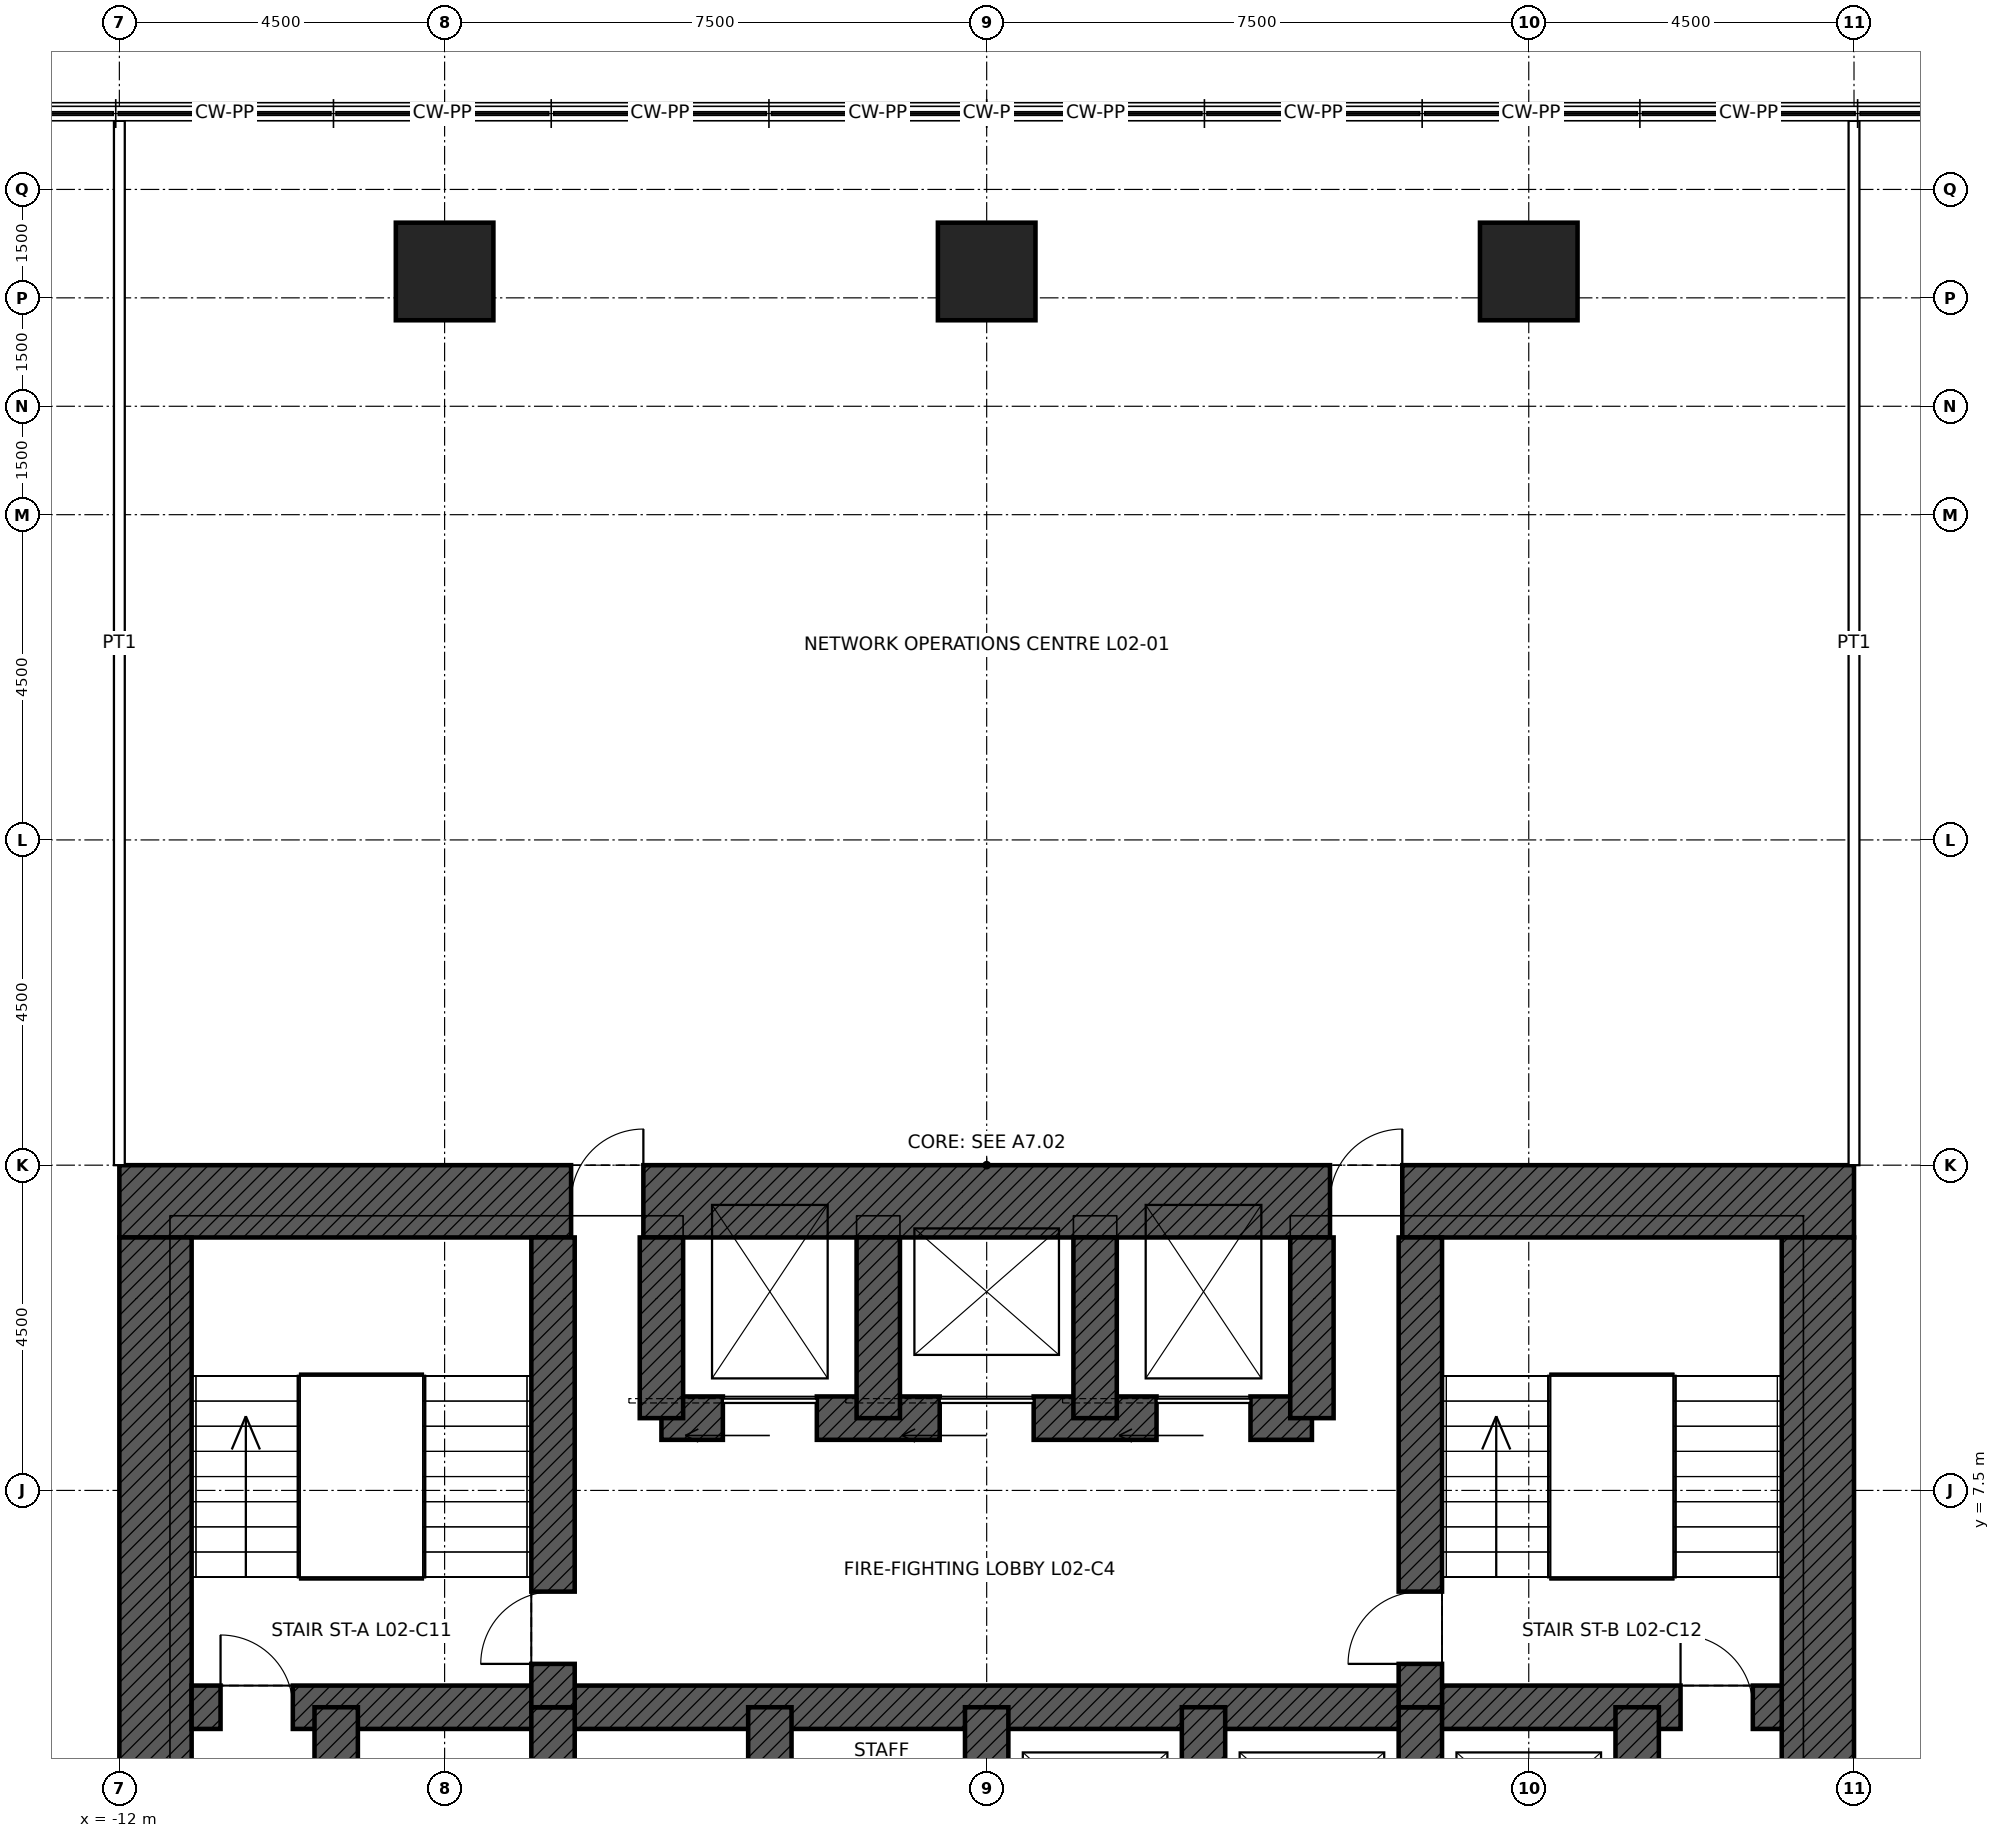
"""IFC4 building model, lengths in metres.
Left out: names, types, materials, properties, quantities, classifications, styles, units other than length and angle.
Written with IfcOpenShell. Run it as: python <this file> out.ifc"""

import sys

from ifc_helpers import new_model, si_unit, direction, frame, frame_2d, origin, origin_2d, place, context, subcontext, project, spatial, rectangle, hollow_rectangle, extrude, element, fill, save


model = new_model("IFC4")
c1 = context("Model", 3, precision=1e-05, world=origin(), true_north=direction((0.0, 1.0)))
c2 = subcontext(c1, "Body", "Model", "MODEL_VIEW")
j1 = project(units=[si_unit("LENGTHUNIT", "METRE"), si_unit("PLANEANGLEUNIT", "RADIAN")], contexts=[c1])
p1 = place(None, origin())
s1 = spatial("IfcSite", under=j1, at=p1, CompositionType="ELEMENT")
p2 = place(p1, origin())
s2 = spatial("IfcBuilding", under=s1, at=p2, CompositionType="ELEMENT")
p3 = place(p2, frame((0.0, 0.0, 12.6)))
s3 = spatial("IfcBuildingStorey", under=s2, at=p3, CompositionType="ELEMENT", Elevation=12.6)
for number, where, z_axis, x_axis in (
    (1, (-7.5, 24.365, 0.0), (0.0, 0.0, 1.0), (1.0, 0.0, 0.0)),
    (2, (0.0, 24.365, 0.0), (0.0, 0.0, 1.0), (1.0, 0.0, 0.0)),
    (3, (7.5, 24.365, 0.0), (0.0, 0.0, 1.0), (1.0, 0.0, 0.0)),
):
    element("IfcColumn", number, at=place(p3, frame(where, z_axis=z_axis, x_axis=x_axis)), inside=s3, PredefinedType="COLUMN", context=c2, shape_type="SweptSolid", body=[
        extrude(hollow_rectangle(XDim=1.35, YDim=1.35, WallThickness=0.1, at=origin_2d()), origin(), (0.0, 0.0, 1.0), 5.4),
    ])
p4 = place(p3, frame((-12.0, 11.5, 0.0), z_axis=(0.0, 0.0, 1.0), x_axis=(1.0, 0.0, 0.0)))
e4 = element("IfcWall", 4, at=p4, inside=s3, PredefinedType="SHEAR", context=c2, shape_type="SweptSolid", body=[
    extrude(rectangle(XDim=24.0, YDim=1.0, at=frame_2d((12.0, 0.0))), origin(), (0.0, 0.0, 1.0), 5.4),
])
p5 = place(p4, frame((6.25, 0.0, 0.0)))
e5 = element("IfcOpeningElement", 5, at=p5, cuts=e4, PredefinedType="OPENING", context=c2, shape_type="SweptSolid", body=[
    extrude(rectangle(XDim=1.0, YDim=2.4, at=frame_2d((0.5, 1.2))), frame((0.0, 0.51, 0.0), z_axis=(0.0, -1.0, 0.0), x_axis=(1.0, 0.0, 0.0)), (0.0, 0.0, 1.0), 1.02),
])
p6 = place(p4, frame((16.75, 0.0, 0.0)))
e6 = element("IfcOpeningElement", 6, at=p6, cuts=e4, PredefinedType="OPENING", context=c2, shape_type="SweptSolid", body=[
    extrude(rectangle(XDim=1.0, YDim=2.4, at=frame_2d((0.5, 1.2))), frame((0.0, 0.51, 0.0), z_axis=(0.0, -1.0, 0.0), x_axis=(1.0, 0.0, 0.0)), (0.0, 0.0, 1.0), 1.02),
])
p7 = place(p3, frame((11.5, 11.0, 0.0), z_axis=(0.0, 0.0, 1.0), x_axis=(0.0, -1.0, 0.0)))
e7 = element("IfcWall", 7, at=p7, inside=s3, PredefinedType="SHEAR", context=c2, shape_type="SweptSolid", body=[
    extrude(rectangle(XDim=22.0, YDim=1.0, at=frame_2d((11.0, 0.0))), origin(), (0.0, 0.0, 1.0), 5.4),
])
p8 = place(p7, frame((10.5, 0.0, 0.0)))
e8 = element("IfcOpeningElement", 8, at=p8, cuts=e7, PredefinedType="OPENING", context=c2, shape_type="SweptSolid", body=[
    extrude(rectangle(XDim=1.0, YDim=2.4, at=frame_2d((0.5, 1.2))), frame((0.0, 0.51, 0.0), z_axis=(0.0, -1.0, 0.0), x_axis=(1.0, 0.0, 0.0)), (0.0, 0.0, 1.0), 1.02),
])
p9 = place(p3, frame((-11.5, -11.0, 0.0), z_axis=(0.0, 0.0, 1.0), x_axis=(0.0, 1.0, 0.0)))
e9 = element("IfcWall", 9, at=p9, inside=s3, PredefinedType="SHEAR", context=c2, shape_type="SweptSolid", body=[
    extrude(rectangle(XDim=22.0, YDim=1.0, at=frame_2d((11.0, 0.0))), origin(), (0.0, 0.0, 1.0), 5.4),
])
p10 = place(p9, frame((10.5, 0.0, 0.0)))
e10 = element("IfcOpeningElement", 10, at=p10, cuts=e9, PredefinedType="OPENING", context=c2, shape_type="SweptSolid", body=[
    extrude(rectangle(XDim=1.0, YDim=2.4, at=frame_2d((0.5, 1.2))), frame((0.0, 0.51, 0.0), z_axis=(0.0, -1.0, 0.0), x_axis=(1.0, 0.0, 0.0)), (0.0, 0.0, 1.0), 1.02),
])
p11 = place(p3, frame((-11.0, 4.5, 0.0), z_axis=(0.0, 0.0, 1.0), x_axis=(1.0, 0.0, 0.0)))
e11 = element("IfcWall", 11, at=p11, inside=s3, PredefinedType="SHEAR", context=c2, shape_type="SweptSolid", body=[
    extrude(rectangle(XDim=22.0, YDim=0.6, at=frame_2d((11.0, 0.0))), origin(), (0.0, 0.0, 1.0), 5.4),
])
p12 = place(p11, frame((0.4, 0.0, 0.0)))
e12 = element("IfcOpeningElement", 12, at=p12, cuts=e11, PredefinedType="OPENING", context=c2, shape_type="SweptSolid", body=[
    extrude(rectangle(XDim=1.0, YDim=2.1, at=frame_2d((0.5, 1.05))), frame((0.0, 0.31, 0.0), z_axis=(0.0, -1.0, 0.0), x_axis=(1.0, 0.0, 0.0)), (0.0, 0.0, 1.0), 0.62),
])
p13 = place(p11, frame((20.6, 0.0, 0.0)))
e13 = element("IfcOpeningElement", 13, at=p13, cuts=e11, PredefinedType="OPENING", context=c2, shape_type="SweptSolid", body=[
    extrude(rectangle(XDim=1.0, YDim=2.1, at=frame_2d((0.5, 1.05))), frame((0.0, 0.31, 0.0), z_axis=(0.0, -1.0, 0.0), x_axis=(1.0, 0.0, 0.0)), (0.0, 0.0, 1.0), 0.62),
])
p14 = place(p3, frame((-4.5, 8.5, 0.0), z_axis=(0.0, 0.0, 1.0), x_axis=(1.0, 0.0, 0.0)))
e14 = element("IfcWall", 14, at=p14, inside=s3, PredefinedType="SHEAR", context=c2, shape_type="SweptSolid", body=[
    extrude(rectangle(XDim=9.0, YDim=0.6, at=frame_2d((4.5, 0.0))), origin(), (0.0, 0.0, 1.0), 5.4),
])
p15 = place(p14, frame((0.85, 0.0, 0.0)))
e15 = element("IfcOpeningElement", 15, at=p15, cuts=e14, PredefinedType="OPENING", context=c2, shape_type="SweptSolid", body=[
    extrude(rectangle(XDim=1.3, YDim=2.4, at=frame_2d((0.65, 1.2))), frame((0.0, 0.31, 0.0), z_axis=(0.0, -1.0, 0.0), x_axis=(1.0, 0.0, 0.0)), (0.0, 0.0, 1.0), 0.62),
])
p16 = place(p14, frame((6.85, 0.0, 0.0)))
e16 = element("IfcOpeningElement", 16, at=p16, cuts=e14, PredefinedType="OPENING", context=c2, shape_type="SweptSolid", body=[
    extrude(rectangle(XDim=1.3, YDim=2.4, at=frame_2d((0.65, 1.2))), frame((0.0, 0.31, 0.0), z_axis=(0.0, -1.0, 0.0), x_axis=(1.0, 0.0, 0.0)), (0.0, 0.0, 1.0), 0.62),
])
p17 = place(p14, frame((3.85, 0.0, 0.0)))
e17 = element("IfcOpeningElement", 17, at=p17, cuts=e14, PredefinedType="OPENING", context=c2, shape_type="SweptSolid", body=[
    extrude(rectangle(XDim=1.3, YDim=2.4, at=frame_2d((0.65, 1.2))), frame((0.0, 0.31, 0.0), z_axis=(0.0, -1.0, 0.0), x_axis=(1.0, 0.0, 0.0)), (0.0, 0.0, 1.0), 0.62),
])
for number, where, z_axis, x_axis in (
    (18, (-9.0, 1.5, 0.0), (0.0, 0.0, 1.0), (0.0, 1.0, 0.0)),
    (19, (9.0, 1.5, 0.0), (0.0, 0.0, 1.0), (0.0, 1.0, 0.0)),
    (20, (-6.0, 1.5, 0.0), (0.0, 0.0, 1.0), (0.0, 1.0, 0.0)),
    (21, (-3.0, 1.5, 0.0), (0.0, 0.0, 1.0), (0.0, 1.0, 0.0)),
    (22, (0.0, 1.5, 0.0), (0.0, 0.0, 1.0), (0.0, 1.0, 0.0)),
    (23, (3.0, 1.5, 0.0), (0.0, 0.0, 1.0), (0.0, 1.0, 0.0)),
    (24, (6.0, 1.5, 0.0), (0.0, 0.0, 1.0), (0.0, 1.0, 0.0)),
):
    element("IfcWall", number, at=place(p3, frame(where, z_axis=z_axis, x_axis=x_axis)), inside=s3, PredefinedType="SHEAR", context=c2, shape_type="SweptSolid", body=[
        extrude(rectangle(XDim=3.0, YDim=0.6, at=frame_2d((1.5, 0.0))), origin(), (0.0, 0.0, 1.0), 5.4),
    ])
p18 = place(p3, frame((-6.0, 4.5, 0.0), z_axis=(0.0, 0.0, 1.0), x_axis=(0.0, 1.0, 0.0)))
e25 = element("IfcWall", 25, at=p18, inside=s3, PredefinedType="SHEAR", context=c2, shape_type="SweptSolid", body=[
    extrude(rectangle(XDim=6.5, YDim=0.6, at=frame_2d((3.25, 0.0))), origin(), (0.0, 0.0, 1.0), 5.4),
])
p19 = place(p18, frame((0.6, 0.0, 0.0)))
e26 = element("IfcOpeningElement", 26, at=p19, cuts=e25, PredefinedType="OPENING", context=c2, shape_type="SweptSolid", body=[
    extrude(rectangle(XDim=1.0, YDim=2.1, at=frame_2d((0.5, 1.05))), frame((0.0, 0.31, 0.0), z_axis=(0.0, -1.0, 0.0), x_axis=(1.0, 0.0, 0.0)), (0.0, 0.0, 1.0), 0.62),
])
p20 = place(p3, frame((6.0, 4.5, 0.0), z_axis=(0.0, 0.0, 1.0), x_axis=(0.0, 1.0, 0.0)))
e27 = element("IfcWall", 27, at=p20, inside=s3, PredefinedType="SHEAR", context=c2, shape_type="SweptSolid", body=[
    extrude(rectangle(XDim=6.5, YDim=0.6, at=frame_2d((3.25, 0.0))), origin(), (0.0, 0.0, 1.0), 5.4),
])
p21 = place(p20, frame((0.6, 0.0, 0.0)))
e28 = element("IfcOpeningElement", 28, at=p21, cuts=e27, PredefinedType="OPENING", context=c2, shape_type="SweptSolid", body=[
    extrude(rectangle(XDim=1.0, YDim=2.1, at=frame_2d((0.5, 1.05))), frame((0.0, 0.31, 0.0), z_axis=(0.0, -1.0, 0.0), x_axis=(1.0, 0.0, 0.0)), (0.0, 0.0, 1.0), 0.62),
])
for number, where, z_axis, x_axis in (
    (29, (-4.5, 8.5, 0.0), (0.0, 0.0, 1.0), (0.0, 1.0, 0.0)),
    (30, (4.5, 8.5, 0.0), (0.0, 0.0, 1.0), (0.0, 1.0, 0.0)),
    (31, (-1.5, 8.5, 0.0), (0.0, 0.0, 1.0), (0.0, 1.0, 0.0)),
    (32, (1.5, 8.5, 0.0), (0.0, 0.0, 1.0), (0.0, 1.0, 0.0)),
):
    element("IfcWall", number, at=place(p3, frame(where, z_axis=z_axis, x_axis=x_axis)), inside=s3, PredefinedType="SHEAR", context=c2, shape_type="SweptSolid", body=[
        extrude(rectangle(XDim=2.5, YDim=0.6, at=frame_2d((1.25, 0.0))), origin(), (0.0, 0.0, 1.0), 5.4),
    ])
p22 = place(p3, frame((-12.0, 12.0, 0.0), z_axis=(0.0, 0.0, 1.0), x_axis=(0.0, 1.0, 0.0)))
e33 = element("IfcWall", 33, at=p22, inside=s3, PredefinedType="PARTITIONING", context=c2, shape_type="SweptSolid", body=[
    extrude(rectangle(XDim=14.45, YDim=0.15, at=frame_2d((7.225, 0.0))), origin(), (0.0, 0.0, 1.0), 4.108),
])
p23 = place(p3, frame((12.0, 12.0, 0.0), z_axis=(0.0, 0.0, 1.0), x_axis=(0.0, 1.0, 0.0)))
e34 = element("IfcWall", 34, at=p23, inside=s3, PredefinedType="PARTITIONING", context=c2, shape_type="SweptSolid", body=[
    extrude(rectangle(XDim=14.45, YDim=0.15, at=frame_2d((7.225, 0.0))), origin(), (0.0, 0.0, 1.0), 5.15),
])
p24 = place(p12, origin())
e35 = element("IfcDoor", 35, at=p24, inside=s3, OperationType="SINGLE_SWING_LEFT", PredefinedType="DOOR", context=c2, shape_type="SweptSolid", body=[
    extrude(rectangle(XDim=1.0, YDim=2.1, at=frame_2d((0.5, 1.05))), frame((0.0, 0.025, 0.0), z_axis=(0.0, -1.0, 0.0), x_axis=(1.0, 0.0, 0.0)), (0.0, 0.0, 1.0), 0.05),
])
fill(e12, e35)
p25 = place(p13, origin())
e36 = element("IfcDoor", 36, at=p25, inside=s3, OperationType="SINGLE_SWING_LEFT", PredefinedType="DOOR", context=c2, shape_type="SweptSolid", body=[
    extrude(rectangle(XDim=1.0, YDim=2.1, at=frame_2d((0.5, 1.05))), frame((0.0, 0.025, 0.0), z_axis=(0.0, -1.0, 0.0), x_axis=(1.0, 0.0, 0.0)), (0.0, 0.0, 1.0), 0.05),
])
fill(e13, e36)
p26 = place(p19, origin())
e37 = element("IfcDoor", 37, at=p26, inside=s3, OperationType="SINGLE_SWING_LEFT", PredefinedType="DOOR", context=c2, shape_type="SweptSolid", body=[
    extrude(rectangle(XDim=1.0, YDim=2.1, at=frame_2d((0.5, 1.05))), frame((0.0, 0.025, 0.0), z_axis=(0.0, -1.0, 0.0), x_axis=(1.0, 0.0, 0.0)), (0.0, 0.0, 1.0), 0.05),
])
fill(e26, e37)
p27 = place(p21, origin())
e38 = element("IfcDoor", 38, at=p27, inside=s3, OperationType="SINGLE_SWING_LEFT", PredefinedType="DOOR", context=c2, shape_type="SweptSolid", body=[
    extrude(rectangle(XDim=1.0, YDim=2.1, at=frame_2d((0.5, 1.05))), frame((0.0, 0.025, 0.0), z_axis=(0.0, -1.0, 0.0), x_axis=(1.0, 0.0, 0.0)), (0.0, 0.0, 1.0), 0.05),
])
fill(e28, e38)
p28 = place(p5, origin())
e39 = element("IfcDoor", 39, at=p28, inside=s3, OperationType="SINGLE_SWING_RIGHT", PredefinedType="DOOR", context=c2, shape_type="SweptSolid", body=[
    extrude(rectangle(XDim=1.0, YDim=2.4, at=frame_2d((0.5, 1.2))), frame((0.0, 0.485, 0.0), z_axis=(0.0, -1.0, 0.0), x_axis=(1.0, 0.0, 0.0)), (0.0, 0.0, 1.0), 0.05),
])
fill(e5, e39)
p29 = place(p6, origin())
e40 = element("IfcDoor", 40, at=p29, inside=s3, OperationType="SINGLE_SWING_RIGHT", PredefinedType="DOOR", context=c2, shape_type="SweptSolid", body=[
    extrude(rectangle(XDim=1.0, YDim=2.4, at=frame_2d((0.5, 1.2))), frame((0.0, 0.485, 0.0), z_axis=(0.0, -1.0, 0.0), x_axis=(1.0, 0.0, 0.0)), (0.0, 0.0, 1.0), 0.05),
])
fill(e6, e40)
p30 = place(p15, origin())
e41 = element("IfcDoor", 41, at=p30, inside=s3, OperationType="SLIDING_TO_LEFT", PredefinedType="DOOR", context=c2, shape_type="SweptSolid", body=[
    extrude(rectangle(XDim=1.3, YDim=2.4, at=frame_2d((0.65, 1.2))), frame((0.0, 0.025, 0.0), z_axis=(0.0, -1.0, 0.0), x_axis=(1.0, 0.0, 0.0)), (0.0, 0.0, 1.0), 0.05),
])
fill(e15, e41)
p31 = place(p16, origin())
e42 = element("IfcDoor", 42, at=p31, inside=s3, OperationType="SLIDING_TO_LEFT", PredefinedType="DOOR", context=c2, shape_type="SweptSolid", body=[
    extrude(rectangle(XDim=1.3, YDim=2.4, at=frame_2d((0.65, 1.2))), frame((0.0, 0.025, 0.0), z_axis=(0.0, -1.0, 0.0), x_axis=(1.0, 0.0, 0.0)), (0.0, 0.0, 1.0), 0.05),
])
fill(e16, e42)
p32 = place(p17, origin())
e43 = element("IfcDoor", 43, at=p32, inside=s3, OperationType="SLIDING_TO_LEFT", PredefinedType="DOOR", context=c2, shape_type="SweptSolid", body=[
    extrude(rectangle(XDim=1.3, YDim=2.4, at=frame_2d((0.65, 1.2))), frame((0.0, 0.025, 0.0), z_axis=(0.0, -1.0, 0.0), x_axis=(1.0, 0.0, 0.0)), (0.0, 0.0, 1.0), 0.05),
])
fill(e17, e43)
save(model, sys.argv[1])
